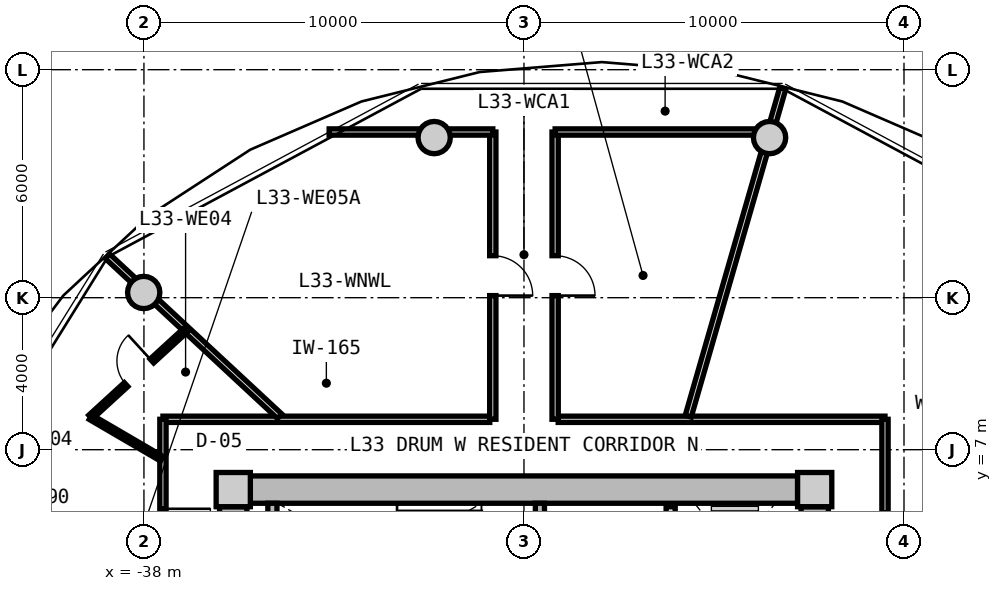
"""IFC4 building model, lengths in metres.
Left out: names, types, materials, properties, quantities, classifications, styles, units other than length and angle.
Written with IfcOpenShell. Run it as: python <this file> out.ifc"""

import sys

from ifc_helpers import new_model, si_unit, direction, frame, frame_2d, origin, origin_2d, place, context, subcontext, project, spatial, rectangle, circle, extrude, source, transform, mapped, element, fill, save


model = new_model("IFC4")
c1 = context("Model", 3, precision=1e-05, world=origin(), true_north=direction((0.0, 1.0)))
c2 = subcontext(c1, "Body", "Model", "MODEL_VIEW")
j1 = project(units=[si_unit("LENGTHUNIT", "METRE"), si_unit("PLANEANGLEUNIT", "RADIAN")], contexts=[c1])
p1 = place(None, origin())
s1 = spatial("IfcSite", under=j1, at=p1, CompositionType="ELEMENT")
p2 = place(p1, origin())
s2 = spatial("IfcBuilding", under=s1, at=p2, CompositionType="ELEMENT")
p3 = place(p2, frame((0.0, 0.0, 108.45)))
s3 = spatial("IfcBuildingStorey", under=s2, at=p3, CompositionType="ELEMENT", Elevation=108.45)
m1 = source(origin(), c2, "Body", "SweptSolid", [
    extrude(rectangle(XDim=0.9, YDim=0.9, at=origin_2d()), origin(), (0.0, 0.0, 1.0), 3.05),
])
for number, where, z_axis, x_axis in (
    (1, (-20.35, 5.95, 0.0), (0.0, 0.0, 1.0), (1.0, 0.0, 0.0)),
    (2, (-35.65, 5.95, 0.0), (0.0, 0.0, 1.0), (1.0, 0.0, 0.0)),
):
    element("IfcColumn", number, at=place(p3, frame(where, z_axis=z_axis, x_axis=x_axis)), inside=s3, PredefinedType="COLUMN", context=c2, shape_type="MappedRepresentation", body=[
        mapped(m1, transform((0.0, 0.0, 0.0), x_axis=(1.0, 0.0, 0.0), y_axis=(0.0, 1.0, 0.0), z_axis=(0.0, 0.0, 1.0), scale=1.0)),
    ])
m2 = source(origin(), c2, "Body", "SweptSolid", [
    extrude(rectangle(XDim=14.4, YDim=0.72, at=frame_2d((7.2, 0.0))), origin(), (0.0, 0.0, 1.0), 2.79),
])
p4 = place(p3, frame((-35.2, 5.95, 0.0), z_axis=(0.0, 0.0, 1.0), x_axis=(1.0, 0.0, 0.0)))
e3 = element("IfcWall", 3, at=p4, inside=s3, PredefinedType="SHEAR", context=c2, shape_type="MappedRepresentation", body=[
    mapped(m2, transform((0.0, 0.0, 0.0), x_axis=(1.0, 0.0, 0.0), y_axis=(0.0, 1.0, 0.0), z_axis=(0.0, 0.0, 1.0), scale=1.0)),
])
m3 = source(origin(), c2, "Body", "SweptSolid", [
    extrude(rectangle(XDim=11.0, YDim=0.72, at=frame_2d((5.5, 0.0))), origin(), (0.0, 0.0, 1.0), 2.79),
])
p5 = place(p3, frame((-35.65, -5.5, 0.0), z_axis=(0.0, 0.0, 1.0), x_axis=(0.0, 1.0, 0.0)))
e4 = element("IfcWall", 4, at=p5, inside=s3, PredefinedType="SHEAR", context=c2, shape_type="MappedRepresentation", body=[
    mapped(m3, transform((0.0, 0.0, 0.0), x_axis=(1.0, 0.0, 0.0), y_axis=(0.0, 1.0, 0.0), z_axis=(0.0, 0.0, 1.0), scale=1.0)),
])
p6 = place(p5, frame((3.8, 0.0, 0.0)))
e5 = element("IfcOpeningElement", 5, at=p6, cuts=e4, PredefinedType="OPENING", context=c2, shape_type="SweptSolid", body=[
    extrude(rectangle(XDim=1.2, YDim=2.15, at=frame_2d((0.6, 1.075))), frame((0.0, 0.37, 0.0), z_axis=(0.0, -1.0, 0.0), x_axis=(1.0, 0.0, 0.0)), (0.0, 0.0, 1.0), 0.74),
])
p7 = place(p3, frame((-20.35, 5.5, 0.0), z_axis=(0.0, 0.0, 1.0), x_axis=(0.0, -1.0, 0.0)))
e6 = element("IfcWall", 6, at=p7, inside=s3, PredefinedType="SHEAR", context=c2, shape_type="MappedRepresentation", body=[
    mapped(m3, transform((0.0, 0.0, 0.0), x_axis=(1.0, 0.0, 0.0), y_axis=(0.0, 1.0, 0.0), z_axis=(0.0, 0.0, 1.0), scale=1.0)),
])
p8 = place(p7, frame((5.65, 0.0, 0.0)))
e7 = element("IfcOpeningElement", 7, at=p8, cuts=e6, PredefinedType="OPENING", context=c2, shape_type="SweptSolid", body=[
    extrude(rectangle(XDim=1.2, YDim=2.15, at=frame_2d((0.6, 1.075))), frame((0.0, 0.37, 0.0), z_axis=(0.0, -1.0, 0.0), x_axis=(1.0, 0.0, 0.0)), (0.0, 0.0, 1.0), 0.74),
])
m4 = source(origin(), c2, "Body", "SweptSolid", [
    extrude(circle(Radius=0.425, at=origin_2d()), origin(), (0.0, 0.0, 1.0), 3.05),
])
for number, where, z_axis, x_axis in (
    (8, (-21.537, 15.213, 0.0), (0.0, 0.0, 1.0), (1.0, 0.0, 0.0)),
    (9, (-30.363, 15.213, 0.0), (0.0, 0.0, 1.0), (1.0, 0.0, 0.0)),
    (10, (-38.006, 11.137, 0.0), (0.0, 0.0, 1.0), (1.0, 0.0, 0.0)),
):
    element("IfcColumn", number, at=place(p3, frame(where, z_axis=z_axis, x_axis=x_axis)), inside=s3, PredefinedType="COLUMN", context=c2, shape_type="MappedRepresentation", body=[
        mapped(m4, transform((0.0, 0.0, 0.0), x_axis=(1.0, 0.0, 0.0), y_axis=(0.0, 1.0, 0.0), z_axis=(0.0, 0.0, 1.0), scale=1.0)),
    ])
m5 = source(origin(), c2, "Body", "SweptSolid", [
    extrude(rectangle(XDim=3.14, YDim=0.24, at=frame_2d((1.57, 0.0))), origin(), (0.0, 0.0, 1.0), 2.79),
])
p9 = place(p3, frame((-34.62, 2.45, 0.0), z_axis=(0.0, 0.0, 1.0), x_axis=(0.0, 1.0, 0.0)))
e11 = element("IfcWall", 11, at=p9, inside=s3, PredefinedType="PARTITIONING", context=c2, shape_type="MappedRepresentation", body=[
    mapped(m5, transform((0.0, 0.0, 0.0), x_axis=(1.0, 0.0, 0.0), y_axis=(0.0, 1.0, 0.0), z_axis=(0.0, 0.0, 1.0), scale=1.0)),
])
p10 = place(p3, frame((-27.58, 2.45, 0.0), z_axis=(0.0, 0.0, 1.0), x_axis=(0.0, 1.0, 0.0)))
e12 = element("IfcWall", 12, at=p10, inside=s3, PredefinedType="PARTITIONING", context=c2, shape_type="MappedRepresentation", body=[
    mapped(m5, transform((0.0, 0.0, 0.0), x_axis=(1.0, 0.0, 0.0), y_axis=(0.0, 1.0, 0.0), z_axis=(0.0, 0.0, 1.0), scale=1.0)),
])
p11 = place(p10, frame((0.55, 0.0, 0.0)))
e13 = element("IfcOpeningElement", 13, at=p11, cuts=e12, PredefinedType="OPENING", context=c2, shape_type="SweptSolid", body=[
    extrude(rectangle(XDim=1.1, YDim=2.15, at=frame_2d((0.55, 1.075))), frame((0.0, 0.13, 0.0), z_axis=(0.0, -1.0, 0.0), x_axis=(1.0, 0.0, 0.0)), (0.0, 0.0, 1.0), 0.26),
])
m6 = source(origin(), c2, "Body", "SweptSolid", [
    extrude(rectangle(XDim=5.0, YDim=0.24, at=frame_2d((2.5, 0.0))), origin(), (0.0, 0.0, 1.0), 2.775),
])
p12 = place(p3, frame((-24.14, 0.5, 0.0), z_axis=(0.0, 0.0, 1.0), x_axis=(0.0, 1.0, 0.0)))
e14 = element("IfcWall", 14, at=p12, inside=s3, PredefinedType="PARTITIONING", context=c2, shape_type="MappedRepresentation", body=[
    mapped(m6, transform((0.0, 0.0, 0.0), x_axis=(1.0, 0.0, 0.0), y_axis=(0.0, 1.0, 0.0), z_axis=(0.0, 0.0, 1.0), scale=1.0)),
])
p13 = place(p12, frame((3.05, 0.0, 0.0)))
e15 = element("IfcOpeningElement", 15, at=p13, cuts=e14, PredefinedType="OPENING", context=c2, shape_type="SweptSolid", body=[
    extrude(rectangle(XDim=1.3, YDim=2.2, at=frame_2d((0.65, 1.1))), frame((0.0, 0.13, 0.0), z_axis=(0.0, -1.0, 0.0), x_axis=(1.0, 0.0, 0.0)), (0.0, 0.0, 1.0), 0.26),
])
p14 = place(p12, frame((0.55, 0.0, 0.0)))
e16 = element("IfcOpeningElement", 16, at=p14, cuts=e14, PredefinedType="OPENING", context=c2, shape_type="SweptSolid", body=[
    extrude(rectangle(XDim=1.3, YDim=2.2, at=frame_2d((0.65, 1.1))), frame((0.0, 0.13, 0.0), z_axis=(0.0, -1.0, 0.0), x_axis=(1.0, 0.0, 0.0)), (0.0, 0.0, 1.0), 0.26),
])
m7 = source(origin(), c2, "Body", "SweptSolid", [
    extrude(rectangle(XDim=8.6, YDim=0.165, at=frame_2d((4.3, 0.0))), origin(), (0.0, 0.0, 1.0), 2.775),
])
for number, where, z_axis, x_axis in (
    (17, (-37.5, 7.8, 0.0), (0.0, 0.0, 1.0), (1.0, 0.0, 0.0)),
    (18, (-27.1, 7.8, 0.0), (0.0, 0.0, 1.0), (1.0, 0.0, 0.0)),
):
    element("IfcWall", number, at=place(p3, frame(where, z_axis=z_axis, x_axis=x_axis)), inside=s3, PredefinedType="PARTITIONING", context=c2, shape_type="MappedRepresentation", body=[
        mapped(m7, transform((0.0, 0.0, 0.0), x_axis=(1.0, 0.0, 0.0), y_axis=(0.0, 1.0, 0.0), z_axis=(0.0, 0.0, 1.0), scale=1.0)),
    ])
m8 = source(origin(), c2, "Body", "SweptSolid", [
    extrude(rectangle(XDim=15.6, YDim=0.165, at=frame_2d((7.8, 0.0))), origin(), (0.0, 0.0, 1.0), 2.775),
])
p15 = place(p3, frame((-37.5, -7.8, 0.0), z_axis=(0.0, 0.0, 1.0), x_axis=(0.0, 1.0, 0.0)))
e19 = element("IfcWall", 19, at=p15, inside=s3, PredefinedType="PARTITIONING", context=c2, shape_type="MappedRepresentation", body=[
    mapped(m8, transform((0.0, 0.0, 0.0), x_axis=(1.0, 0.0, 0.0), y_axis=(0.0, 1.0, 0.0), z_axis=(0.0, 0.0, 1.0), scale=1.0)),
])
p16 = place(p15, frame((11.994, 0.0, 0.0)))
e20 = element("IfcOpeningElement", 20, at=p16, cuts=e19, PredefinedType="OPENING", context=c2, shape_type="SweptSolid", body=[
    extrude(rectangle(XDim=1.25, YDim=2.2, at=frame_2d((0.625, 1.1))), frame((0.0, 0.093, 0.0), z_axis=(0.0, -1.0, 0.0), x_axis=(1.0, 0.0, 0.0)), (0.0, 0.0, 1.0), 0.185),
])
p17 = place(p15, frame((7.984, 0.0, 0.0)))
e21 = element("IfcOpeningElement", 21, at=p17, cuts=e19, PredefinedType="OPENING", context=c2, shape_type="SweptSolid", body=[
    extrude(rectangle(XDim=1.05, YDim=2.15, at=frame_2d((0.525, 1.075))), frame((0.0, 0.093, 0.0), z_axis=(0.0, -1.0, 0.0), x_axis=(1.0, 0.0, 0.0)), (0.0, 0.0, 1.0), 0.185),
])
p18 = place(p15, frame((5.777, 0.0, 0.0)))
e22 = element("IfcOpeningElement", 22, at=p18, cuts=e19, PredefinedType="OPENING", context=c2, shape_type="SweptSolid", body=[
    extrude(rectangle(XDim=1.05, YDim=2.15, at=frame_2d((0.525, 1.075))), frame((0.0, 0.093, 0.0), z_axis=(0.0, -1.0, 0.0), x_axis=(1.0, 0.0, 0.0)), (0.0, 0.0, 1.0), 0.185),
])
p19 = place(p3, frame((-18.5, 7.8, 0.0), z_axis=(0.0, 0.0, 1.0), x_axis=(0.0, -1.0, 0.0)))
e23 = element("IfcWall", 23, at=p19, inside=s3, PredefinedType="PARTITIONING", context=c2, shape_type="MappedRepresentation", body=[
    mapped(m8, transform((0.0, 0.0, 0.0), x_axis=(1.0, 0.0, 0.0), y_axis=(0.0, 1.0, 0.0), z_axis=(0.0, 0.0, 1.0), scale=1.0)),
])
p20 = place(p19, frame((12.002, 0.0, 0.0)))
e24 = element("IfcOpeningElement", 24, at=p20, cuts=e23, PredefinedType="OPENING", context=c2, shape_type="SweptSolid", body=[
    extrude(rectangle(XDim=1.05, YDim=2.15, at=frame_2d((0.525, 1.075))), frame((0.0, 0.093, 0.0), z_axis=(0.0, -1.0, 0.0), x_axis=(1.0, 0.0, 0.0)), (0.0, 0.0, 1.0), 0.185),
])
p21 = place(p19, frame((10.211, 0.0, 0.0)))
e25 = element("IfcOpeningElement", 25, at=p21, cuts=e23, PredefinedType="OPENING", context=c2, shape_type="SweptSolid", body=[
    extrude(rectangle(XDim=1.05, YDim=2.15, at=frame_2d((0.525, 1.075))), frame((0.0, 0.093, 0.0), z_axis=(0.0, -1.0, 0.0), x_axis=(1.0, 0.0, 0.0)), (0.0, 0.0, 1.0), 0.185),
])
p22 = place(p19, frame((7.722, 0.0, 0.0)))
e26 = element("IfcOpeningElement", 26, at=p22, cuts=e23, PredefinedType="OPENING", context=c2, shape_type="SweptSolid", body=[
    extrude(rectangle(XDim=1.05, YDim=2.15, at=frame_2d((0.525, 1.075))), frame((0.0, 0.093, 0.0), z_axis=(0.0, -1.0, 0.0), x_axis=(1.0, 0.0, 0.0)), (0.0, 0.0, 1.0), 0.185),
])
p23 = place(p19, frame((6.291, 0.0, 0.0)))
e27 = element("IfcOpeningElement", 27, at=p23, cuts=e23, PredefinedType="OPENING", context=c2, shape_type="SweptSolid", body=[
    extrude(rectangle(XDim=1.05, YDim=2.15, at=frame_2d((0.525, 1.075))), frame((0.0, 0.093, 0.0), z_axis=(0.0, -1.0, 0.0), x_axis=(1.0, 0.0, 0.0)), (0.0, 0.0, 1.0), 0.185),
])
p24 = place(p19, frame((2.465, 0.0, 0.0)))
e28 = element("IfcOpeningElement", 28, at=p24, cuts=e23, PredefinedType="OPENING", context=c2, shape_type="SweptSolid", body=[
    extrude(rectangle(XDim=1.25, YDim=2.2, at=frame_2d((0.625, 1.1))), frame((0.0, 0.093, 0.0), z_axis=(0.0, -1.0, 0.0), x_axis=(1.0, 0.0, 0.0)), (0.0, 0.0, 1.0), 0.185),
])
m9 = source(origin(), c2, "Body", "SweptSolid", [
    extrude(rectangle(XDim=8.989, YDim=0.165, at=frame_2d((4.495, 0.0))), origin(), (0.0, 0.0, 1.0), 2.275),
])
p25 = place(p3, frame((-23.678, 7.88, 0.0), z_axis=(0.0, 0.0, 1.0), x_axis=(0.27702323008, 0.960863221274, 0.0)))
e29 = element("IfcWall", 29, at=p25, inside=s3, PredefinedType="PARTITIONING", context=c2, shape_type="MappedRepresentation", body=[
    mapped(m9, transform((0.0, 0.0, 0.0), x_axis=(1.0, 0.0, 0.0), y_axis=(0.0, 1.0, 0.0), z_axis=(0.0, 0.0, 1.0), scale=1.0)),
])
m10 = source(origin(), c2, "Body", "SweptSolid", [
    extrude(rectangle(XDim=6.187, YDim=0.165, at=frame_2d((3.093, 0.0))), origin(), (0.0, 0.0, 1.0), 2.275),
])
p26 = place(p3, frame((-34.429, 7.88, 0.0), z_axis=(0.0, 0.0, 1.0), x_axis=(-0.732501077882, 0.680765870841, 0.0)))
e30 = element("IfcWall", 30, at=p26, inside=s3, PredefinedType="PARTITIONING", context=c2, shape_type="MappedRepresentation", body=[
    mapped(m10, transform((0.0, 0.0, 0.0), x_axis=(1.0, 0.0, 0.0), y_axis=(0.0, 1.0, 0.0), z_axis=(0.0, 0.0, 1.0), scale=1.0)),
])
m11 = source(origin(), c2, "Body", "SweptSolid", [
    extrude(rectangle(XDim=7.56, YDim=0.165, at=frame_2d((3.78, 0.0))), origin(), (0.0, 0.0, 1.0), 2.775),
])
p27 = place(p3, frame((-28.82, 7.8, 0.0), z_axis=(0.0, 0.0, 1.0), x_axis=(0.0, 1.0, 0.0)))
e31 = element("IfcWall", 31, at=p27, inside=s3, PredefinedType="PARTITIONING", context=c2, shape_type="MappedRepresentation", body=[
    mapped(m11, transform((0.0, 0.0, 0.0), x_axis=(1.0, 0.0, 0.0), y_axis=(0.0, 1.0, 0.0), z_axis=(0.0, 0.0, 1.0), scale=1.0)),
])
p28 = place(p27, frame((3.255, 0.0, 0.0)))
e32 = element("IfcOpeningElement", 32, at=p28, cuts=e31, PredefinedType="OPENING", context=c2, shape_type="SweptSolid", body=[
    extrude(rectangle(XDim=1.05, YDim=2.15, at=frame_2d((0.525, 1.075))), frame((0.0, 0.093, 0.0), z_axis=(0.0, -1.0, 0.0), x_axis=(1.0, 0.0, 0.0)), (0.0, 0.0, 1.0), 0.185),
])
m12 = source(origin(), c2, "Body", "SweptSolid", [
    extrude(rectangle(XDim=4.307, YDim=0.165, at=frame_2d((2.153, 0.0))), origin(), (0.0, 0.0, 1.0), 2.275),
])
p29 = place(p3, frame((-33.127, 15.36, 0.0), z_axis=(0.0, 0.0, 1.0), x_axis=(1.0, 0.0, 0.0)))
e33 = element("IfcWall", 33, at=p29, inside=s3, PredefinedType="PARTITIONING", context=c2, shape_type="MappedRepresentation", body=[
    mapped(m12, transform((0.0, 0.0, 0.0), x_axis=(1.0, 0.0, 0.0), y_axis=(0.0, 1.0, 0.0), z_axis=(0.0, 0.0, 1.0), scale=1.0)),
])
p30 = place(p3, frame((-27.18, 7.8, 0.0), z_axis=(0.0, 0.0, 1.0), x_axis=(0.0, 1.0, 0.0)))
e34 = element("IfcWall", 34, at=p30, inside=s3, PredefinedType="PARTITIONING", context=c2, shape_type="MappedRepresentation", body=[
    mapped(m11, transform((0.0, 0.0, 0.0), x_axis=(1.0, 0.0, 0.0), y_axis=(0.0, 1.0, 0.0), z_axis=(0.0, 0.0, 1.0), scale=1.0)),
])
p31 = place(p30, frame((3.255, 0.0, 0.0)))
e35 = element("IfcOpeningElement", 35, at=p31, cuts=e34, PredefinedType="OPENING", context=c2, shape_type="SweptSolid", body=[
    extrude(rectangle(XDim=1.05, YDim=2.15, at=frame_2d((0.525, 1.075))), frame((0.0, 0.093, 0.0), z_axis=(0.0, -1.0, 0.0), x_axis=(1.0, 0.0, 0.0)), (0.0, 0.0, 1.0), 0.185),
])
m13 = source(origin(), c2, "Body", "SweptSolid", [
    extrude(rectangle(XDim=5.814, YDim=0.165, at=frame_2d((2.907, 0.0))), origin(), (0.0, 0.0, 1.0), 2.275),
])
p32 = place(p3, frame((-27.18, 15.36, 0.0), z_axis=(0.0, 0.0, 1.0), x_axis=(1.0, 0.0, 0.0)))
e36 = element("IfcWall", 36, at=p32, inside=s3, PredefinedType="PARTITIONING", context=c2, shape_type="MappedRepresentation", body=[
    mapped(m13, transform((0.0, 0.0, 0.0), x_axis=(1.0, 0.0, 0.0), y_axis=(0.0, 1.0, 0.0), z_axis=(0.0, 0.0, 1.0), scale=1.0)),
])
m14 = source(origin(), c2, "Body", "SweptSolid", [
    extrude(rectangle(XDim=2.172, YDim=0.14, at=frame_2d((1.086, 0.0))), origin(), (0.0, 0.0, 1.0), 2.775),
])
p33 = place(p3, frame((-37.53, 6.762, 0.0), z_axis=(0.0, 0.0, 1.0), x_axis=(-0.863562702562, 0.504241468688, 0.0)))
e37 = element("IfcWall", 37, at=p33, inside=s3, PredefinedType="PARTITIONING", context=c2, shape_type="MappedRepresentation", body=[
    mapped(m14, transform((0.0, 0.0, 0.0), x_axis=(1.0, 0.0, 0.0), y_axis=(0.0, 1.0, 0.0), z_axis=(0.0, 0.0, 1.0), scale=1.0)),
])
m15 = source(origin(), c2, "Body", "SweptSolid", [
    extrude(rectangle(XDim=3.457, YDim=0.14, at=frame_2d((1.729, 0.0))), origin(), (0.0, 0.0, 1.0), 2.775),
])
p34 = place(p3, frame((-39.405, 7.857, 0.0), z_axis=(0.0, 0.0, 1.0), x_axis=(0.737567375492, 0.675273549467, 0.0)))
e38 = element("IfcWall", 38, at=p34, inside=s3, PredefinedType="PARTITIONING", context=c2, shape_type="MappedRepresentation", body=[
    mapped(m15, transform((0.0, 0.0, 0.0), x_axis=(1.0, 0.0, 0.0), y_axis=(0.0, 1.0, 0.0), z_axis=(0.0, 0.0, 1.0), scale=1.0)),
])
p35 = place(p34, frame((1.268, 0.0, 0.0)))
e39 = element("IfcOpeningElement", 39, at=p35, cuts=e38, PredefinedType="OPENING", context=c2, shape_type="SweptSolid", body=[
    extrude(rectangle(XDim=0.92, YDim=2.1, at=frame_2d((0.46, 1.05))), frame((0.0, 0.08, 0.0), z_axis=(0.0, -1.0, 0.0), x_axis=(1.0, 0.0, 0.0)), (0.0, 0.0, 1.0), 0.16),
])
m16 = source(origin(), c2, "Body", "SweptSolid", [
    extrude(rectangle(XDim=1.05, YDim=2.15, at=frame_2d((0.525, 1.075))), frame((0.0, 0.025, 0.0), z_axis=(0.0, -1.0, 0.0), x_axis=(1.0, 0.0, 0.0)), (0.0, 0.0, 1.0), 0.05),
])
p36 = place(p28, frame((1.05, 0.0, 0.0), z_axis=(0.0, 0.0, 1.0), x_axis=(-1.0, 0.0, 0.0)))
e40 = element("IfcDoor", 40, at=p36, inside=s3, OperationType="SINGLE_SWING_RIGHT", PredefinedType="DOOR", context=c2, shape_type="MappedRepresentation", body=[
    mapped(m16, transform((0.0, 0.0, 0.0), x_axis=(1.0, 0.0, 0.0), y_axis=(0.0, 1.0, 0.0), z_axis=(0.0, 0.0, 1.0), scale=1.0)),
])
fill(e32, e40)
p37 = place(p31, frame((1.05, 0.0, 0.0), z_axis=(0.0, 0.0, 1.0), x_axis=(-1.0, 0.0, 0.0)))
e41 = element("IfcDoor", 41, at=p37, inside=s3, OperationType="SINGLE_SWING_RIGHT", PredefinedType="DOOR", context=c2, shape_type="MappedRepresentation", body=[
    mapped(m16, transform((0.0, 0.0, 0.0), x_axis=(1.0, 0.0, 0.0), y_axis=(0.0, 1.0, 0.0), z_axis=(0.0, 0.0, 1.0), scale=1.0)),
])
fill(e35, e41)
m17 = source(origin(), c2, "Body", "SweptSolid", [
    extrude(rectangle(XDim=1.25, YDim=2.2, at=frame_2d((0.625, 1.1))), frame((0.0, 0.025, 0.0), z_axis=(0.0, -1.0, 0.0), x_axis=(1.0, 0.0, 0.0)), (0.0, 0.0, 1.0), 0.05),
])
p38 = place(p16, frame((1.25, 0.0, 0.0), z_axis=(0.0, 0.0, 1.0), x_axis=(-1.0, 0.0, 0.0)))
e42 = element("IfcDoor", 42, at=p38, inside=s3, OperationType="SINGLE_SWING_LEFT", PredefinedType="DOOR", context=c2, shape_type="MappedRepresentation", body=[
    mapped(m17, transform((0.0, 0.0, 0.0), x_axis=(1.0, 0.0, 0.0), y_axis=(0.0, 1.0, 0.0), z_axis=(0.0, 0.0, 1.0), scale=1.0)),
])
fill(e20, e42)
m18 = source(origin(), c2, "Body", "SweptSolid", [
    extrude(rectangle(XDim=0.92, YDim=2.1, at=frame_2d((0.46, 1.05))), frame((0.0, 0.025, 0.0), z_axis=(0.0, -1.0, 0.0), x_axis=(1.0, 0.0, 0.0)), (0.0, 0.0, 1.0), 0.05),
])
p39 = place(p35, origin())
e43 = element("IfcDoor", 43, at=p39, inside=s3, OperationType="SINGLE_SWING_RIGHT", PredefinedType="DOOR", context=c2, shape_type="MappedRepresentation", body=[
    mapped(m18, transform((0.0, 0.0, 0.0), x_axis=(1.0, 0.0, 0.0), y_axis=(0.0, 1.0, 0.0), z_axis=(0.0, 0.0, 1.0), scale=1.0)),
])
fill(e39, e43)
save(model, sys.argv[1])
